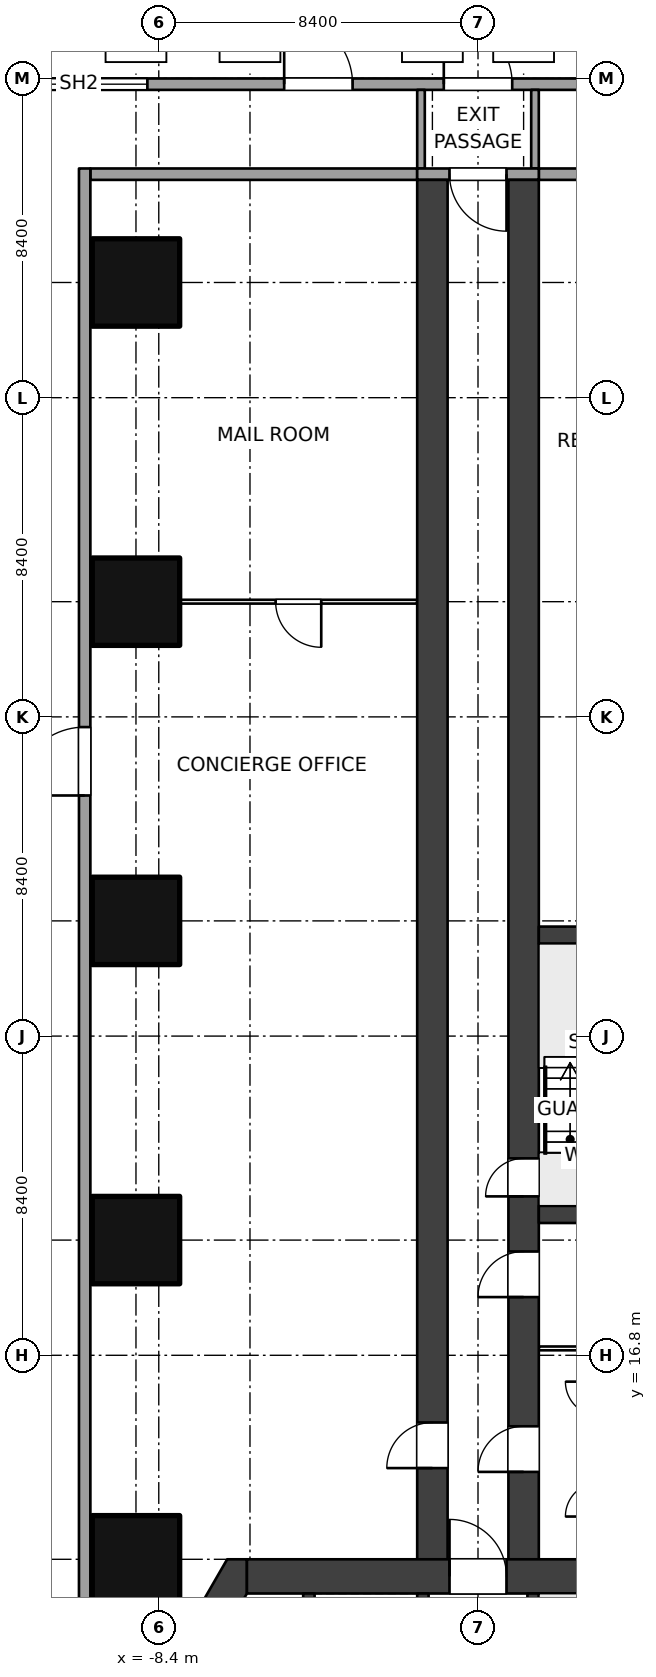
"""IFC4 building model, lengths in metres.
Left out: names, types, materials, properties, quantities, classifications, styles, units other than length and angle.
Written with IfcOpenShell. Run it as: python <this file> out.ifc"""

import sys

from ifc_helpers import new_model, si_unit, direction, frame, frame_2d, origin, origin_2d, place, context, subcontext, project, spatial, polyline, rectangle, outline, extrude, element, fill, save


model = new_model("IFC4")
c1 = context("Model", 3, precision=1e-05, world=origin(), true_north=direction((0.0, 1.0)))
c2 = subcontext(c1, "Body", "Model", "MODEL_VIEW")
j1 = project(units=[si_unit("LENGTHUNIT", "METRE"), si_unit("PLANEANGLEUNIT", "RADIAN")], contexts=[c1])
p1 = place(None, origin())
s1 = spatial("IfcSite", under=j1, at=p1, CompositionType="ELEMENT")
p2 = place(p1, origin())
s2 = spatial("IfcBuilding", under=s1, at=p2, CompositionType="ELEMENT")
p3 = place(p2, origin())
s3 = spatial("IfcBuildingStorey", under=s2, at=p3, CompositionType="ELEMENT", Elevation=0.0)
for number, where, z_axis, x_axis in (
    (1, (-9.0, 11.432, 0.0), (0.0, 0.0, 1.0), (1.0, 0.0, 0.0)),
    (2, (-9.0, 19.832, 0.0), (0.0, 0.0, 1.0), (1.0, 0.0, 0.0)),
    (3, (-9.0, 28.231, 0.0), (0.0, 0.0, 1.0), (1.0, 0.0, 0.0)),
    (4, (-9.0, 36.632, 0.0), (0.0, 0.0, 1.0), (1.0, 0.0, 0.0)),
    (5, (-9.0, 45.031, 0.0), (0.0, 0.0, 1.0), (1.0, 0.0, 0.0)),
):
    element("IfcColumn", number, at=place(p3, frame(where, z_axis=z_axis, x_axis=x_axis)), inside=s3, PredefinedType="COLUMN", context=c2, shape_type="SweptSolid", body=[
        extrude(rectangle(XDim=2.3, YDim=2.3, at=origin_2d()), origin(), (0.0, 0.0, 1.0), 6.0),
    ])
p4 = place(p3, frame((-6.08, 10.981, 0.0), z_axis=(0.0, 0.0, 1.0), x_axis=(1.0, 0.0, 0.0)))
e6 = element("IfcWall", 6, at=p4, inside=s3, PredefinedType="SHEAR", context=c2, shape_type="SweptSolid", body=[
    extrude(rectangle(XDim=12.161, YDim=0.9, at=frame_2d((6.08, 0.0))), origin(), (0.0, 0.0, 1.0), 6.0),
])
p5 = place(p4, frame((5.33, 0.0, 0.0)))
e7 = element("IfcOpeningElement", 7, at=p5, cuts=e6, PredefinedType="OPENING", context=c2, shape_type="SweptSolid", body=[
    extrude(rectangle(XDim=1.5, YDim=2.1, at=frame_2d((0.75, 1.05))), frame((0.0, 0.46, 0.0), z_axis=(0.0, -1.0, 0.0), x_axis=(1.0, 0.0, 0.0)), (0.0, 0.0, 1.0), 0.92),
])
p6 = place(p3, origin())
e8 = element("IfcWall", 8, at=p6, inside=s3, PredefinedType="SHEAR", context=c2, shape_type="SweptSolid", body=[
    extrude(outline(polyline([(-6.6, 11.432), (-13.2, 0.0), (-12.94, -0.45), (-12.161, 0.0), (-6.08, 10.531), (-6.08, 11.432), (-6.6, 11.432)])), origin(), (0.0, 0.0, 1.0), 6.0),
])
p7 = place(p3, frame((1.45, 3.63, 0.0), z_axis=(0.0, 0.0, 1.0), x_axis=(0.0, 1.0, 0.0)))
e9 = element("IfcWall", 9, at=p7, inside=s3, PredefinedType="SHEAR", context=c2, shape_type="SweptSolid", body=[
    extrude(rectangle(XDim=6.902, YDim=0.3, at=frame_2d((3.451, 0.0))), origin(), (0.0, 0.0, 1.0), 6.0),
])
p8 = place(p7, frame((0.25, 0.0, 0.0)))
e10 = element("IfcOpeningElement", 10, at=p8, cuts=e9, PredefinedType="OPENING", context=c2, shape_type="SweptSolid", body=[
    extrude(rectangle(XDim=1.0, YDim=2.1, at=frame_2d((0.5, 1.05))), frame((0.0, 0.16, 0.0), z_axis=(0.0, -1.0, 0.0), x_axis=(1.0, 0.0, 0.0)), (0.0, 0.0, 1.0), 0.32),
])
p9 = place(p3, frame((-1.45, 3.63, 0.0), z_axis=(0.0, 0.0, 1.0), x_axis=(0.0, 1.0, 0.0)))
e11 = element("IfcWall", 11, at=p9, inside=s3, PredefinedType="SHEAR", context=c2, shape_type="SweptSolid", body=[
    extrude(rectangle(XDim=6.902, YDim=0.3, at=frame_2d((3.451, 0.0))), origin(), (0.0, 0.0, 1.0), 6.0),
])
p10 = place(p9, frame((4.85, 0.0, 0.0)))
e12 = element("IfcOpeningElement", 12, at=p10, cuts=e11, PredefinedType="OPENING", context=c2, shape_type="SweptSolid", body=[
    extrude(rectangle(XDim=1.1, YDim=2.1, at=frame_2d((0.55, 1.05))), frame((0.0, 0.16, 0.0), z_axis=(0.0, -1.0, 0.0), x_axis=(1.0, 0.0, 0.0)), (0.0, 0.0, 1.0), 0.32),
])
p11 = place(p3, frame((-4.45, 3.63, 0.0), z_axis=(0.0, 0.0, 1.0), x_axis=(0.0, 1.0, 0.0)))
e13 = element("IfcWall", 13, at=p11, inside=s3, PredefinedType="SHEAR", context=c2, shape_type="SweptSolid", body=[
    extrude(rectangle(XDim=6.902, YDim=0.3, at=frame_2d((3.451, 0.0))), origin(), (0.0, 0.0, 1.0), 6.0),
])
p12 = place(p3, frame((-1.2, 10.981, 0.0), z_axis=(0.0, 0.0, 1.0), x_axis=(0.0, 1.0, 0.0)))
e14 = element("IfcWall", 14, at=p12, inside=s3, PredefinedType="SHEAR", context=c2, shape_type="SweptSolid", body=[
    extrude(rectangle(XDim=36.75, YDim=0.8, at=frame_2d((18.375, 0.0))), origin(), (0.0, 0.0, 1.0), 6.0),
])
p13 = place(p12, frame((2.85, 0.0, 0.0)))
e15 = element("IfcOpeningElement", 15, at=p13, cuts=e14, PredefinedType="OPENING", context=c2, shape_type="SweptSolid", body=[
    extrude(rectangle(XDim=1.2, YDim=2.1, at=frame_2d((0.6, 1.05))), frame((0.0, 0.41, 0.0), z_axis=(0.0, -1.0, 0.0), x_axis=(1.0, 0.0, 0.0)), (0.0, 0.0, 1.0), 0.82),
])
p14 = place(p3, frame((1.2, 10.981, 0.0), z_axis=(0.0, 0.0, 1.0), x_axis=(0.0, 1.0, 0.0)))
e16 = element("IfcWall", 16, at=p14, inside=s3, PredefinedType="SHEAR", context=c2, shape_type="SweptSolid", body=[
    extrude(rectangle(XDim=36.75, YDim=0.8, at=frame_2d((18.375, 0.0))), origin(), (0.0, 0.0, 1.0), 6.0),
])
p15 = place(p14, frame((10.0, 0.0, 0.0)))
e17 = element("IfcOpeningElement", 17, at=p15, cuts=e16, PredefinedType="OPENING", context=c2, shape_type="SweptSolid", body=[
    extrude(rectangle(XDim=1.0, YDim=2.1, at=frame_2d((0.5, 1.05))), frame((0.0, 0.41, 0.0), z_axis=(0.0, -1.0, 0.0), x_axis=(1.0, 0.0, 0.0)), (0.0, 0.0, 1.0), 0.82),
])
p16 = place(p14, frame((2.75, 0.0, 0.0)))
e18 = element("IfcOpeningElement", 18, at=p16, cuts=e16, PredefinedType="OPENING", context=c2, shape_type="SweptSolid", body=[
    extrude(rectangle(XDim=1.2, YDim=2.1, at=frame_2d((0.6, 1.05))), frame((0.0, 0.41, 0.0), z_axis=(0.0, -1.0, 0.0), x_axis=(1.0, 0.0, 0.0)), (0.0, 0.0, 1.0), 0.82),
])
p17 = place(p14, frame((7.35, 0.0, 0.0)))
e19 = element("IfcOpeningElement", 19, at=p17, cuts=e16, PredefinedType="OPENING", context=c2, shape_type="SweptSolid", body=[
    extrude(rectangle(XDim=1.2, YDim=2.1, at=frame_2d((0.6, 1.05))), frame((0.0, 0.41, 0.0), z_axis=(0.0, -1.0, 0.0), x_axis=(1.0, 0.0, 0.0)), (0.0, 0.0, 1.0), 0.82),
])
p18 = place(p3, frame((-50.4, 50.25, 0.0), z_axis=(0.0, 0.0, 1.0), x_axis=(1.0, 0.0, 0.0)))
e20 = element("IfcWall", 20, at=p18, inside=s3, PredefinedType="SOLIDWALL", context=c2, shape_type="SweptSolid", body=[
    extrude(rectangle(XDim=100.8, YDim=0.3, at=frame_2d((50.4, 0.0))), origin(), (0.0, 0.0, 1.0), 4.7),
])
p19 = place(p18, frame((11.7, 0.0, 0.0)))
e21 = element("IfcOpeningElement", 21, at=p19, cuts=e20, PredefinedType="OPENING", context=c2, shape_type="SweptSolid", body=[
    extrude(rectangle(XDim=1.8, YDim=2.4, at=frame_2d((0.9, 1.2))), frame((0.0, 0.16, 0.0), z_axis=(0.0, -1.0, 0.0), x_axis=(1.0, 0.0, 0.0)), (0.0, 0.0, 1.0), 0.32),
])
p20 = place(p18, frame((20.1, 0.0, 0.0)))
e22 = element("IfcOpeningElement", 22, at=p20, cuts=e20, PredefinedType="OPENING", context=c2, shape_type="SweptSolid", body=[
    extrude(rectangle(XDim=1.8, YDim=2.4, at=frame_2d((0.9, 1.2))), frame((0.0, 0.16, 0.0), z_axis=(0.0, -1.0, 0.0), x_axis=(1.0, 0.0, 0.0)), (0.0, 0.0, 1.0), 0.32),
])
p21 = place(p18, frame((29.64, 0.0, 0.0)))
e23 = element("IfcOpeningElement", 23, at=p21, cuts=e20, PredefinedType="OPENING", context=c2, shape_type="SweptSolid", body=[
    extrude(rectangle(XDim=1.2, YDim=2.4, at=frame_2d((0.6, 1.2))), frame((0.0, 0.16, 0.0), z_axis=(0.0, -1.0, 0.0), x_axis=(1.0, 0.0, 0.0)), (0.0, 0.0, 1.0), 0.32),
])
p22 = place(p18, frame((45.3, 0.0, 0.0)))
e24 = element("IfcOpeningElement", 24, at=p22, cuts=e20, PredefinedType="OPENING", context=c2, shape_type="SweptSolid", body=[
    extrude(rectangle(XDim=1.8, YDim=2.4, at=frame_2d((0.9, 1.2))), frame((0.0, 0.16, 0.0), z_axis=(0.0, -1.0, 0.0), x_axis=(1.0, 0.0, 0.0)), (0.0, 0.0, 1.0), 0.32),
])
p23 = place(p18, frame((49.5, 0.0, 0.0)))
e25 = element("IfcOpeningElement", 25, at=p23, cuts=e20, PredefinedType="OPENING", context=c2, shape_type="SweptSolid", body=[
    extrude(rectangle(XDim=1.8, YDim=2.4, at=frame_2d((0.9, 1.2))), frame((0.0, 0.16, 0.0), z_axis=(0.0, -1.0, 0.0), x_axis=(1.0, 0.0, 0.0)), (0.0, 0.0, 1.0), 0.32),
])
p24 = place(p18, frame((53.7, 0.0, 0.0)))
e26 = element("IfcOpeningElement", 26, at=p24, cuts=e20, PredefinedType="OPENING", context=c2, shape_type="SweptSolid", body=[
    extrude(rectangle(XDim=1.8, YDim=2.4, at=frame_2d((0.9, 1.2))), frame((0.0, 0.16, 0.0), z_axis=(0.0, -1.0, 0.0), x_axis=(1.0, 0.0, 0.0)), (0.0, 0.0, 1.0), 0.32),
])
p25 = place(p18, frame((69.96, 0.0, 0.0)))
e27 = element("IfcOpeningElement", 27, at=p25, cuts=e20, PredefinedType="OPENING", context=c2, shape_type="SweptSolid", body=[
    extrude(rectangle(XDim=1.2, YDim=2.4, at=frame_2d((0.6, 1.2))), frame((0.0, 0.16, 0.0), z_axis=(0.0, -1.0, 0.0), x_axis=(1.0, 0.0, 0.0)), (0.0, 0.0, 1.0), 0.32),
])
p26 = place(p18, frame((78.9, 0.0, 0.0)))
e28 = element("IfcOpeningElement", 28, at=p26, cuts=e20, PredefinedType="OPENING", context=c2, shape_type="SweptSolid", body=[
    extrude(rectangle(XDim=1.8, YDim=2.4, at=frame_2d((0.9, 1.2))), frame((0.0, 0.16, 0.0), z_axis=(0.0, -1.0, 0.0), x_axis=(1.0, 0.0, 0.0)), (0.0, 0.0, 1.0), 0.32),
])
p27 = place(p18, frame((87.3, 0.0, 0.0)))
e29 = element("IfcOpeningElement", 29, at=p27, cuts=e20, PredefinedType="OPENING", context=c2, shape_type="SweptSolid", body=[
    extrude(rectangle(XDim=1.8, YDim=2.4, at=frame_2d((0.9, 1.2))), frame((0.0, 0.16, 0.0), z_axis=(0.0, -1.0, 0.0), x_axis=(1.0, 0.0, 0.0)), (0.0, 0.0, 1.0), 0.32),
])
p28 = place(p18, frame((0.75, 0.0, 0.3)))
e30 = element("IfcOpeningElement", 30, at=p28, cuts=e20, PredefinedType="OPENING", context=c2, shape_type="SweptSolid", body=[
    extrude(rectangle(XDim=3.15, YDim=3.0, at=frame_2d((1.575, 1.5))), frame((0.0, 0.16, 0.0), z_axis=(0.0, -1.0, 0.0), x_axis=(1.0, 0.0, 0.0)), (0.0, 0.0, 1.0), 0.32),
])
p29 = place(p18, frame((4.5, 0.0, 0.3)))
e31 = element("IfcOpeningElement", 31, at=p29, cuts=e20, PredefinedType="OPENING", context=c2, shape_type="SweptSolid", body=[
    extrude(rectangle(XDim=3.15, YDim=3.0, at=frame_2d((1.575, 1.5))), frame((0.0, 0.16, 0.0), z_axis=(0.0, -1.0, 0.0), x_axis=(1.0, 0.0, 0.0)), (0.0, 0.0, 1.0), 0.32),
])
p30 = place(p18, frame((25.95, 0.0, 0.3)))
e32 = element("IfcOpeningElement", 32, at=p30, cuts=e20, PredefinedType="OPENING", context=c2, shape_type="SweptSolid", body=[
    extrude(rectangle(XDim=3.15, YDim=3.0, at=frame_2d((1.575, 1.5))), frame((0.0, 0.16, 0.0), z_axis=(0.0, -1.0, 0.0), x_axis=(1.0, 0.0, 0.0)), (0.0, 0.0, 1.0), 0.32),
])
p31 = place(p18, frame((34.35, 0.0, 0.3)))
e33 = element("IfcOpeningElement", 33, at=p31, cuts=e20, PredefinedType="OPENING", context=c2, shape_type="SweptSolid", body=[
    extrude(rectangle(XDim=3.15, YDim=3.0, at=frame_2d((1.575, 1.5))), frame((0.0, 0.16, 0.0), z_axis=(0.0, -1.0, 0.0), x_axis=(1.0, 0.0, 0.0)), (0.0, 0.0, 1.0), 0.32),
])
p32 = place(p18, frame((38.1, 0.0, 0.3)))
e34 = element("IfcOpeningElement", 34, at=p32, cuts=e20, PredefinedType="OPENING", context=c2, shape_type="SweptSolid", body=[
    extrude(rectangle(XDim=3.6, YDim=3.0, at=frame_2d((1.8, 1.5))), frame((0.0, 0.16, 0.0), z_axis=(0.0, -1.0, 0.0), x_axis=(1.0, 0.0, 0.0)), (0.0, 0.0, 1.0), 0.32),
])
p33 = place(p18, frame((59.1, 0.0, 0.3)))
e35 = element("IfcOpeningElement", 35, at=p33, cuts=e20, PredefinedType="OPENING", context=c2, shape_type="SweptSolid", body=[
    extrude(rectangle(XDim=3.6, YDim=3.0, at=frame_2d((1.8, 1.5))), frame((0.0, 0.16, 0.0), z_axis=(0.0, -1.0, 0.0), x_axis=(1.0, 0.0, 0.0)), (0.0, 0.0, 1.0), 0.32),
])
p34 = place(p18, frame((63.3, 0.0, 0.3)))
e36 = element("IfcOpeningElement", 36, at=p34, cuts=e20, PredefinedType="OPENING", context=c2, shape_type="SweptSolid", body=[
    extrude(rectangle(XDim=3.15, YDim=3.0, at=frame_2d((1.575, 1.5))), frame((0.0, 0.16, 0.0), z_axis=(0.0, -1.0, 0.0), x_axis=(1.0, 0.0, 0.0)), (0.0, 0.0, 1.0), 0.32),
])
p35 = place(p18, frame((71.7, 0.0, 0.3)))
e37 = element("IfcOpeningElement", 37, at=p35, cuts=e20, PredefinedType="OPENING", context=c2, shape_type="SweptSolid", body=[
    extrude(rectangle(XDim=3.15, YDim=3.0, at=frame_2d((1.575, 1.5))), frame((0.0, 0.16, 0.0), z_axis=(0.0, -1.0, 0.0), x_axis=(1.0, 0.0, 0.0)), (0.0, 0.0, 1.0), 0.32),
])
p36 = place(p18, frame((93.15, 0.0, 0.3)))
e38 = element("IfcOpeningElement", 38, at=p36, cuts=e20, PredefinedType="OPENING", context=c2, shape_type="SweptSolid", body=[
    extrude(rectangle(XDim=3.15, YDim=3.0, at=frame_2d((1.575, 1.5))), frame((0.0, 0.16, 0.0), z_axis=(0.0, -1.0, 0.0), x_axis=(1.0, 0.0, 0.0)), (0.0, 0.0, 1.0), 0.32),
])
p37 = place(p18, frame((96.9, 0.0, 0.3)))
e39 = element("IfcOpeningElement", 39, at=p37, cuts=e20, PredefinedType="OPENING", context=c2, shape_type="SweptSolid", body=[
    extrude(rectangle(XDim=3.15, YDim=3.0, at=frame_2d((1.575, 1.5))), frame((0.0, 0.16, 0.0), z_axis=(0.0, -1.0, 0.0), x_axis=(1.0, 0.0, 0.0)), (0.0, 0.0, 1.0), 0.32),
])
p38 = place(p3, frame((-1.6, 36.632, 0.0), z_axis=(0.0, 0.0, 1.0), x_axis=(-1.0, 0.0, 0.0)))
e40 = element("IfcWall", 40, at=p38, inside=s3, PredefinedType="PARTITIONING", context=c2, shape_type="SweptSolid", body=[
    extrude(rectangle(XDim=6.25, YDim=0.1, at=frame_2d((3.125, 0.0))), origin(), (0.0, 0.0, 1.0), 3.9),
])
p39 = place(p38, frame((2.525, 0.0, 0.0)))
e41 = element("IfcOpeningElement", 41, at=p39, cuts=e40, PredefinedType="OPENING", context=c2, shape_type="SweptSolid", body=[
    extrude(rectangle(XDim=1.2, YDim=2.1, at=frame_2d((0.6, 1.05))), frame((0.0, 0.06, 0.0), z_axis=(0.0, -1.0, 0.0), x_axis=(1.0, 0.0, 0.0)), (0.0, 0.0, 1.0), 0.12),
])
p40 = place(p3, frame((1.6, 16.981, 0.0), z_axis=(0.0, 0.0, 1.0), x_axis=(1.0, 0.0, 0.0)))
e42 = element("IfcWall", 42, at=p40, inside=s3, PredefinedType="PARTITIONING", context=c2, shape_type="SweptSolid", body=[
    extrude(rectangle(XDim=3.15, YDim=0.1, at=frame_2d((1.575, 0.0))), origin(), (0.0, 0.0, 1.0), 5.7),
])
p41 = place(p3, frame((1.6, 47.882, 0.0), z_axis=(0.0, 0.0, 1.0), x_axis=(-1.0, 0.0, 0.0)))
e43 = element("IfcWall", 43, at=p41, inside=s3, PredefinedType="SOLIDWALL", context=c2, shape_type="SweptSolid", body=[
    extrude(rectangle(XDim=3.2, YDim=0.3, at=frame_2d((1.6, 0.0))), origin(), (0.0, 0.0, 1.0), 5.7),
])
p42 = place(p41, frame((0.85, 0.0, 0.0)))
e44 = element("IfcOpeningElement", 44, at=p42, cuts=e43, PredefinedType="OPENING", context=c2, shape_type="SweptSolid", body=[
    extrude(rectangle(XDim=1.5, YDim=2.1, at=frame_2d((0.75, 1.05))), frame((0.0, 0.16, 0.0), z_axis=(0.0, -1.0, 0.0), x_axis=(1.0, 0.0, 0.0)), (0.0, 0.0, 1.0), 0.32),
])
for number, where, z_axis, x_axis in (
    (45, (-1.5, 48.031, 0.0), (0.0, 0.0, 1.0), (0.0, 1.0, 0.0)),
    (46, (1.5, 48.031, 0.0), (0.0, 0.0, 1.0), (0.0, 1.0, 0.0)),
):
    element("IfcWall", number, at=place(p3, frame(where, z_axis=z_axis, x_axis=x_axis)), inside=s3, PredefinedType="SOLIDWALL", context=c2, shape_type="SweptSolid", body=[
        extrude(rectangle(XDim=2.069, YDim=0.2, at=frame_2d((1.034, 0.0))), origin(), (0.0, 0.0, 1.0), 5.7),
    ])
for number, where, z_axis, x_axis in (
    (47, (-1.6, 47.882, 0.0), (0.0, 0.0, 1.0), (-1.0, 0.0, 0.0)),
    (48, (1.6, 47.882, 0.0), (0.0, 0.0, 1.0), (1.0, 0.0, 0.0)),
):
    element("IfcWall", number, at=place(p3, frame(where, z_axis=z_axis, x_axis=x_axis)), inside=s3, PredefinedType="SOLIDWALL", context=c2, shape_type="SweptSolid", body=[
        extrude(rectangle(XDim=8.6, YDim=0.3, at=frame_2d((4.3, 0.0))), origin(), (0.0, 0.0, 1.0), 4.1),
    ])
p43 = place(p3, frame((-10.35, 6.149, 0.0), z_axis=(0.0, 0.0, 1.0), x_axis=(0.0, 1.0, 0.0)))
e49 = element("IfcWall", 49, at=p43, inside=s3, PredefinedType="SOLIDWALL", context=c2, shape_type="SweptSolid", body=[
    extrude(rectangle(XDim=41.883, YDim=0.3, at=frame_2d((20.941, 0.0))), origin(), (0.0, 0.0, 1.0), 5.7),
])
p44 = place(p43, frame((25.383, 0.0, 0.0)))
e50 = element("IfcOpeningElement", 50, at=p44, cuts=e49, PredefinedType="OPENING", context=c2, shape_type="SweptSolid", body=[
    extrude(rectangle(XDim=1.8, YDim=2.4, at=frame_2d((0.9, 1.2))), frame((0.0, 0.16, 0.0), z_axis=(0.0, -1.0, 0.0), x_axis=(1.0, 0.0, 0.0)), (0.0, 0.0, 1.0), 0.32),
])
for number, where, z_axis, x_axis in (
    (51, (1.6, 20.507, 0.0), (0.0, 0.0, 1.0), (1.0, 0.0, 0.0)),
    (52, (1.6, 27.856, 0.0), (0.0, 0.0, 1.0), (1.0, 0.0, 0.0)),
):
    element("IfcWall", number, at=place(p3, frame(where, z_axis=z_axis, x_axis=x_axis)), inside=s3, PredefinedType="SOLIDWALL", context=c2, shape_type="SweptSolid", body=[
        extrude(rectangle(XDim=3.3, YDim=0.45, at=frame_2d((1.65, 0.0))), origin(), (0.0, 0.0, 1.0), 6.0),
    ])
p45 = place(p22, origin())
e53 = element("IfcDoor", 53, at=p45, inside=s3, OperationType="DOUBLE_DOOR_DOUBLE_SWING", PredefinedType="DOOR", context=c2, shape_type="SweptSolid", body=[
    extrude(rectangle(XDim=1.8, YDim=2.4, at=frame_2d((0.9, 1.2))), frame((0.0, 0.025, 0.0), z_axis=(0.0, -1.0, 0.0), x_axis=(1.0, 0.0, 0.0)), (0.0, 0.0, 1.0), 0.05),
])
fill(e24, e53)
p46 = place(p23, origin())
e54 = element("IfcDoor", 54, at=p46, inside=s3, OperationType="DOUBLE_DOOR_DOUBLE_SWING", PredefinedType="DOOR", context=c2, shape_type="SweptSolid", body=[
    extrude(rectangle(XDim=1.8, YDim=2.4, at=frame_2d((0.9, 1.2))), frame((0.0, 0.025, 0.0), z_axis=(0.0, -1.0, 0.0), x_axis=(1.0, 0.0, 0.0)), (0.0, 0.0, 1.0), 0.05),
])
fill(e25, e54)
p47 = place(p32, origin())
e55 = element("IfcWindow", 55, at=p47, inside=s3, PartitioningType="SINGLE_PANEL", PredefinedType="WINDOW", context=c2, shape_type="SweptSolid", body=[
    extrude(rectangle(XDim=3.6, YDim=3.0, at=frame_2d((1.8, 1.5))), frame((0.0, 0.03, 0.0), z_axis=(0.0, -1.0, 0.0), x_axis=(1.0, 0.0, 0.0)), (0.0, 0.0, 1.0), 0.06),
])
fill(e34, e55)
p48 = place(p5, origin())
e56 = element("IfcDoor", 56, at=p48, inside=s3, OperationType="DOUBLE_DOOR_DOUBLE_SWING", PredefinedType="DOOR", context=c2, shape_type="SweptSolid", body=[
    extrude(rectangle(XDim=1.5, YDim=2.1, at=frame_2d((0.75, 1.05))), frame((0.0, 0.025, 0.0), z_axis=(0.0, -1.0, 0.0), x_axis=(1.0, 0.0, 0.0)), (0.0, 0.0, 1.0), 0.05),
])
fill(e7, e56)
p49 = place(p15, origin())
e57 = element("IfcDoor", 57, at=p49, inside=s3, OperationType="SINGLE_SWING_LEFT", PredefinedType="DOOR", context=c2, shape_type="SweptSolid", body=[
    extrude(rectangle(XDim=1.0, YDim=2.1, at=frame_2d((0.5, 1.05))), frame((0.0, 0.025, 0.0), z_axis=(0.0, -1.0, 0.0), x_axis=(1.0, 0.0, 0.0)), (0.0, 0.0, 1.0), 0.05),
])
fill(e17, e57)
p50 = place(p39, origin())
e58 = element("IfcDoor", 58, at=p50, inside=s3, OperationType="DOUBLE_SWING_LEFT", PredefinedType="DOOR", context=c2, shape_type="SweptSolid", body=[
    extrude(rectangle(XDim=1.2, YDim=2.1, at=frame_2d((0.6, 1.05))), frame((0.0, 0.025, 0.0), z_axis=(0.0, -1.0, 0.0), x_axis=(1.0, 0.0, 0.0)), (0.0, 0.0, 1.0), 0.05),
])
fill(e41, e58)
p51 = place(p13, origin())
e59 = element("IfcDoor", 59, at=p51, inside=s3, OperationType="DOUBLE_SWING_LEFT", PredefinedType="DOOR", context=c2, shape_type="SweptSolid", body=[
    extrude(rectangle(XDim=1.2, YDim=2.1, at=frame_2d((0.6, 1.05))), frame((0.0, 0.025, 0.0), z_axis=(0.0, -1.0, 0.0), x_axis=(1.0, 0.0, 0.0)), (0.0, 0.0, 1.0), 0.05),
])
fill(e15, e59)
p52 = place(p16, origin())
e60 = element("IfcDoor", 60, at=p52, inside=s3, OperationType="DOUBLE_SWING_LEFT", PredefinedType="DOOR", context=c2, shape_type="SweptSolid", body=[
    extrude(rectangle(XDim=1.2, YDim=2.1, at=frame_2d((0.6, 1.05))), frame((0.0, 0.025, 0.0), z_axis=(0.0, -1.0, 0.0), x_axis=(1.0, 0.0, 0.0)), (0.0, 0.0, 1.0), 0.05),
])
fill(e18, e60)
p53 = place(p17, origin())
e61 = element("IfcDoor", 61, at=p53, inside=s3, OperationType="DOUBLE_SWING_LEFT", PredefinedType="DOOR", context=c2, shape_type="SweptSolid", body=[
    extrude(rectangle(XDim=1.2, YDim=2.1, at=frame_2d((0.6, 1.05))), frame((0.0, 0.025, 0.0), z_axis=(0.0, -1.0, 0.0), x_axis=(1.0, 0.0, 0.0)), (0.0, 0.0, 1.0), 0.05),
])
fill(e19, e61)
p54 = place(p42, origin())
e62 = element("IfcDoor", 62, at=p54, inside=s3, OperationType="DOUBLE_DOOR_DOUBLE_SWING", PredefinedType="DOOR", context=c2, shape_type="SweptSolid", body=[
    extrude(rectangle(XDim=1.5, YDim=2.1, at=frame_2d((0.75, 1.05))), frame((0.0, 0.025, 0.0), z_axis=(0.0, -1.0, 0.0), x_axis=(1.0, 0.0, 0.0)), (0.0, 0.0, 1.0), 0.05),
])
fill(e44, e62)
p55 = place(p44, origin())
e63 = element("IfcDoor", 63, at=p55, inside=s3, OperationType="DOUBLE_DOOR_DOUBLE_SWING", PredefinedType="DOOR", context=c2, shape_type="SweptSolid", body=[
    extrude(rectangle(XDim=1.8, YDim=2.4, at=frame_2d((0.9, 1.2))), frame((0.0, 0.025, 0.0), z_axis=(0.0, -1.0, 0.0), x_axis=(1.0, 0.0, 0.0)), (0.0, 0.0, 1.0), 0.05),
])
fill(e50, e63)
save(model, sys.argv[1])
